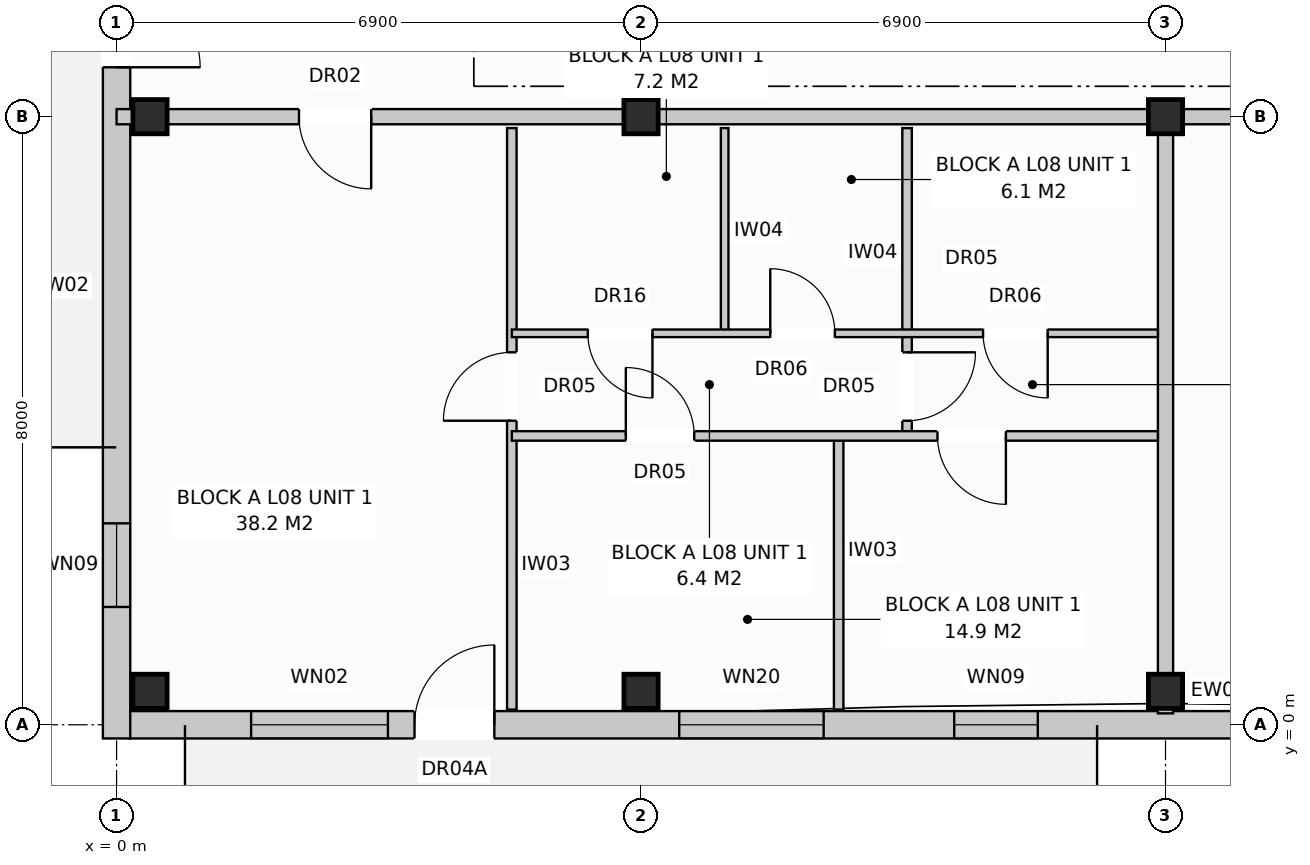
"""IFC4 building model, lengths in metres.
Left out: names, types, materials, properties, quantities, classifications, styles, units other than length and angle.
Written with IfcOpenShell. Run it as: python <this file> out.ifc"""

import sys

from ifc_helpers import new_model, si_unit, direction, frame, frame_2d, origin, origin_with_axes, origin_2d, place, context, subcontext, project, spatial, rectangle, extrude, element, fill, save


model = new_model("IFC4")
c1 = context("Model", 3, precision=1e-05, world=origin(), true_north=direction((0.0, 1.0)))
c2 = subcontext(c1, "Body", "Model", "MODEL_VIEW")
j1 = project(units=[si_unit("LENGTHUNIT", "METRE"), si_unit("PLANEANGLEUNIT", "RADIAN")], contexts=[c1])
p1 = place(None, origin())
s1 = spatial("IfcSite", under=j1, at=p1, CompositionType="ELEMENT")
p2 = place(p1, origin())
s2 = spatial("IfcBuilding", under=s1, at=p2, CompositionType="ELEMENT")
p3 = place(p2, frame((0.0, 0.0, 27.2)))
s3 = spatial("IfcBuildingStorey", under=s2, at=p3, CompositionType="ELEMENT", Elevation=27.2)
for number, where, z_axis, x_axis in (
    (1, (0.44, 0.44, 0.0), (0.0, 0.0, 1.0), (1.0, 0.0, 0.0)),
    (2, (0.44, 8.0, 0.0), (0.0, 0.0, 1.0), (1.0, 0.0, 0.0)),
    (3, (6.9, 0.44, 0.0), (0.0, 0.0, 1.0), (1.0, 0.0, 0.0)),
    (4, (6.9, 8.0, 0.0), (0.0, 0.0, 1.0), (1.0, 0.0, 0.0)),
    (5, (13.8, 0.44, 0.0), (0.0, 0.0, 1.0), (1.0, 0.0, 0.0)),
    (6, (13.8, 8.0, 0.0), (0.0, 0.0, 1.0), (1.0, 0.0, 0.0)),
):
    element("IfcColumn", number, at=place(p3, frame(where, z_axis=z_axis, x_axis=x_axis)), inside=s3, PredefinedType="COLUMN", context=c2, shape_type="SweptSolid", body=[
        extrude(rectangle(XDim=0.45, YDim=0.45, at=origin_2d()), origin(), (0.0, 0.0, 1.0), 3.2),
    ])
p4 = place(p3, frame((0.17, 0.0, 0.0), z_axis=(0.0, 0.0, 1.0), x_axis=(1.0, 0.0, 0.0)))
e7 = element("IfcWall", 7, at=p4, inside=s3, PredefinedType="STANDARD", context=c2, shape_type="SweptSolid", body=[
    extrude(rectangle(XDim=54.86, YDim=0.36, at=frame_2d((27.43, 0.0))), origin(), (0.0, 0.0, 1.0), 2.96),
])
p5 = place(p4, frame((3.75, 0.0, 0.0)))
e8 = element("IfcOpeningElement", 8, at=p5, cuts=e7, PredefinedType="OPENING", context=c2, shape_type="SweptSolid", body=[
    extrude(rectangle(XDim=1.05, YDim=2.12, at=frame_2d((0.525, 1.06))), frame((0.0, 0.192, 0.0), z_axis=(0.0, -1.0, 0.0), x_axis=(1.0, 0.0, 0.0)), (0.0, 0.0, 1.0), 0.384),
])
p6 = place(p4, frame((18.65, 0.0, 0.0)))
e9 = element("IfcOpeningElement", 9, at=p6, cuts=e7, PredefinedType="OPENING", context=c2, shape_type="SweptSolid", body=[
    extrude(rectangle(XDim=1.05, YDim=2.12, at=frame_2d((0.525, 1.06))), frame((0.0, 0.192, 0.0), z_axis=(0.0, -1.0, 0.0), x_axis=(1.0, 0.0, 0.0)), (0.0, 0.0, 1.0), 0.384),
])
p7 = place(p4, frame((29.05, 0.0, 0.0)))
e10 = element("IfcOpeningElement", 10, at=p7, cuts=e7, PredefinedType="OPENING", context=c2, shape_type="SweptSolid", body=[
    extrude(rectangle(XDim=1.05, YDim=2.12, at=frame_2d((0.525, 1.06))), frame((0.0, 0.192, 0.0), z_axis=(0.0, -1.0, 0.0), x_axis=(1.0, 0.0, 0.0)), (0.0, 0.0, 1.0), 0.384),
])
p8 = place(p4, frame((46.447, 0.0, 0.0)))
e11 = element("IfcOpeningElement", 11, at=p8, cuts=e7, PredefinedType="OPENING", context=c2, shape_type="SweptSolid", body=[
    extrude(rectangle(XDim=1.05, YDim=2.12, at=frame_2d((0.525, 1.06))), frame((0.0, 0.192, 0.0), z_axis=(0.0, -1.0, 0.0), x_axis=(1.0, 0.0, 0.0)), (0.0, 0.0, 1.0), 0.384),
])
p9 = place(p4, frame((1.6, 0.0, 0.8)))
e12 = element("IfcOpeningElement", 12, at=p9, cuts=e7, PredefinedType="OPENING", context=c2, shape_type="SweptSolid", body=[
    extrude(rectangle(XDim=1.8, YDim=1.7, at=frame_2d((0.9, 0.85))), frame((0.0, 0.192, 0.0), z_axis=(0.0, -1.0, 0.0), x_axis=(1.0, 0.0, 0.0)), (0.0, 0.0, 1.0), 0.384),
])
p10 = place(p4, frame((7.232, 0.0, 0.72)))
e13 = element("IfcOpeningElement", 13, at=p10, cuts=e7, PredefinedType="OPENING", context=c2, shape_type="SweptSolid", body=[
    extrude(rectangle(XDim=1.9, YDim=1.85, at=frame_2d((0.95, 0.925))), frame((0.0, 0.192, 0.0), z_axis=(0.0, -1.0, 0.0), x_axis=(1.0, 0.0, 0.0)), (0.0, 0.0, 1.0), 0.384),
])
p11 = place(p4, frame((10.85, 0.0, 0.72)))
e14 = element("IfcOpeningElement", 14, at=p11, cuts=e7, PredefinedType="OPENING", context=c2, shape_type="SweptSolid", body=[
    extrude(rectangle(XDim=1.1, YDim=1.5, at=frame_2d((0.55, 0.75))), frame((0.0, 0.192, 0.0), z_axis=(0.0, -1.0, 0.0), x_axis=(1.0, 0.0, 0.0)), (0.0, 0.0, 1.0), 0.384),
])
p12 = place(p4, frame((15.9, 0.0, 0.8)))
e15 = element("IfcOpeningElement", 15, at=p12, cuts=e7, PredefinedType="OPENING", context=c2, shape_type="SweptSolid", body=[
    extrude(rectangle(XDim=1.8, YDim=1.7, at=frame_2d((0.9, 0.85))), frame((0.0, 0.192, 0.0), z_axis=(0.0, -1.0, 0.0), x_axis=(1.0, 0.0, 0.0)), (0.0, 0.0, 1.0), 0.384),
])
p13 = place(p4, frame((21.55, 0.0, 0.72)))
e16 = element("IfcOpeningElement", 16, at=p13, cuts=e7, PredefinedType="OPENING", context=c2, shape_type="SweptSolid", body=[
    extrude(rectangle(XDim=1.9, YDim=1.85, at=frame_2d((0.95, 0.925))), frame((0.0, 0.192, 0.0), z_axis=(0.0, -1.0, 0.0), x_axis=(1.0, 0.0, 0.0)), (0.0, 0.0, 1.0), 0.384),
])
p14 = place(p4, frame((25.6, 0.0, 0.72)))
e17 = element("IfcOpeningElement", 17, at=p14, cuts=e7, PredefinedType="OPENING", context=c2, shape_type="SweptSolid", body=[
    extrude(rectangle(XDim=1.1, YDim=1.5, at=frame_2d((0.55, 0.75))), frame((0.0, 0.192, 0.0), z_axis=(0.0, -1.0, 0.0), x_axis=(1.0, 0.0, 0.0)), (0.0, 0.0, 1.0), 0.384),
])
p15 = place(p4, frame((31.4, 0.0, 0.8)))
e18 = element("IfcOpeningElement", 18, at=p15, cuts=e7, PredefinedType="OPENING", context=c2, shape_type="SweptSolid", body=[
    extrude(rectangle(XDim=1.8, YDim=1.7, at=frame_2d((0.9, 0.85))), frame((0.0, 0.192, 0.0), z_axis=(0.0, -1.0, 0.0), x_axis=(1.0, 0.0, 0.0)), (0.0, 0.0, 1.0), 0.384),
])
p16 = place(p4, frame((35.55, 0.0, 0.72)))
e19 = element("IfcOpeningElement", 19, at=p16, cuts=e7, PredefinedType="OPENING", context=c2, shape_type="SweptSolid", body=[
    extrude(rectangle(XDim=1.9, YDim=1.85, at=frame_2d((0.95, 0.925))), frame((0.0, 0.192, 0.0), z_axis=(0.0, -1.0, 0.0), x_axis=(1.0, 0.0, 0.0)), (0.0, 0.0, 1.0), 0.384),
])
p17 = place(p4, frame((39.25, 0.0, 0.72)))
e20 = element("IfcOpeningElement", 20, at=p17, cuts=e7, PredefinedType="OPENING", context=c2, shape_type="SweptSolid", body=[
    extrude(rectangle(XDim=1.1, YDim=1.5, at=frame_2d((0.55, 0.75))), frame((0.0, 0.192, 0.0), z_axis=(0.0, -1.0, 0.0), x_axis=(1.0, 0.0, 0.0)), (0.0, 0.0, 1.0), 0.384),
])
p18 = place(p4, frame((44.3, 0.0, 0.8)))
e21 = element("IfcOpeningElement", 21, at=p18, cuts=e7, PredefinedType="OPENING", context=c2, shape_type="SweptSolid", body=[
    extrude(rectangle(XDim=1.8, YDim=1.7, at=frame_2d((0.9, 0.85))), frame((0.0, 0.192, 0.0), z_axis=(0.0, -1.0, 0.0), x_axis=(1.0, 0.0, 0.0)), (0.0, 0.0, 1.0), 0.384),
])
p19 = place(p4, frame((49.55, 0.0, 0.72)))
e22 = element("IfcOpeningElement", 22, at=p19, cuts=e7, PredefinedType="OPENING", context=c2, shape_type="SweptSolid", body=[
    extrude(rectangle(XDim=1.1, YDim=1.5, at=frame_2d((0.55, 0.75))), frame((0.0, 0.192, 0.0), z_axis=(0.0, -1.0, 0.0), x_axis=(1.0, 0.0, 0.0)), (0.0, 0.0, 1.0), 0.384),
])
p20 = place(p4, frame((52.29, 0.0, 0.8)))
e23 = element("IfcOpeningElement", 23, at=p20, cuts=e7, PredefinedType="OPENING", context=c2, shape_type="SweptSolid", body=[
    extrude(rectangle(XDim=1.95, YDim=1.65, at=frame_2d((0.975, 0.825))), frame((0.0, 0.192, 0.0), z_axis=(0.0, -1.0, 0.0), x_axis=(1.0, 0.0, 0.0)), (0.0, 0.0, 1.0), 0.384),
])
p21 = place(p3, frame((0.0, -0.18, 0.0), z_axis=(0.0, 0.0, 1.0), x_axis=(0.0, 1.0, 0.0)))
e24 = element("IfcWall", 24, at=p21, inside=s3, PredefinedType="STANDARD", context=c2, shape_type="SweptSolid", body=[
    extrude(rectangle(XDim=18.76, YDim=0.36, at=frame_2d((9.38, 0.0))), origin(), (0.0, 0.0, 1.0), 2.96),
])
p22 = place(p21, frame((8.83, 0.0, 0.0)))
e25 = element("IfcOpeningElement", 25, at=p22, cuts=e24, PredefinedType="OPENING", context=c2, shape_type="SweptSolid", body=[
    extrude(rectangle(XDim=1.1, YDim=2.1, at=frame_2d((0.55, 1.05))), frame((0.0, 0.192, 0.0), z_axis=(0.0, -1.0, 0.0), x_axis=(1.0, 0.0, 0.0)), (0.0, 0.0, 1.0), 0.384),
])
p23 = place(p21, frame((1.73, 0.0, 0.72)))
e26 = element("IfcOpeningElement", 26, at=p23, cuts=e24, PredefinedType="OPENING", context=c2, shape_type="SweptSolid", body=[
    extrude(rectangle(XDim=1.1, YDim=1.5, at=frame_2d((0.55, 0.75))), frame((0.0, 0.192, 0.0), z_axis=(0.0, -1.0, 0.0), x_axis=(1.0, 0.0, 0.0)), (0.0, 0.0, 1.0), 0.384),
])
p24 = place(p21, frame((15.93, 0.0, 0.72)))
e27 = element("IfcOpeningElement", 27, at=p24, cuts=e24, PredefinedType="OPENING", context=c2, shape_type="SweptSolid", body=[
    extrude(rectangle(XDim=1.1, YDim=1.5, at=frame_2d((0.55, 0.75))), frame((0.0, 0.192, 0.0), z_axis=(0.0, -1.0, 0.0), x_axis=(1.0, 0.0, 0.0)), (0.0, 0.0, 1.0), 0.384),
])
p25 = place(p3, frame((13.8, 7.85, 0.0), z_axis=(0.0, 0.0, 1.0), x_axis=(0.0, -1.0, 0.0)))
e28 = element("IfcWall", 28, at=p25, inside=s3, PredefinedType="PARTITIONING", context=c2, shape_type="SweptSolid", body=[
    extrude(rectangle(XDim=7.7, YDim=0.2, at=frame_2d((3.85, 0.0))), origin(), (0.0, 0.0, 1.0), 2.96),
])
p26 = place(p3, frame((0.0, 8.0, 0.0), z_axis=(0.0, 0.0, 1.0), x_axis=(1.0, 0.0, 0.0)))
e29 = element("IfcWall", 29, at=p26, inside=s3, PredefinedType="PARTITIONING", context=c2, shape_type="SweptSolid", body=[
    extrude(rectangle(XDim=13.8, YDim=0.2, at=frame_2d((6.9, 0.0))), origin(), (0.0, 0.0, 1.0), 2.4),
])
p27 = place(p26, frame((2.4, 0.0, 0.0)))
e30 = element("IfcOpeningElement", 30, at=p27, cuts=e29, PredefinedType="OPENING", context=c2, shape_type="SweptSolid", body=[
    extrude(rectangle(XDim=0.95, YDim=2.15, at=frame_2d((0.475, 1.075))), frame((0.0, 0.112, 0.0), z_axis=(0.0, -1.0, 0.0), x_axis=(1.0, 0.0, 0.0)), (0.0, 0.0, 1.0), 0.224),
])
p28 = place(p3, frame((5.2, 7.85, 0.0), z_axis=(0.0, 0.0, 1.0), x_axis=(0.0, -1.0, 0.0)))
e31 = element("IfcWall", 31, at=p28, inside=s3, PredefinedType="PARTITIONING", context=c2, shape_type="SweptSolid", body=[
    extrude(rectangle(XDim=7.65, YDim=0.125, at=frame_2d((3.825, 0.0))), origin(), (0.0, 0.0, 1.0), 2.96),
])
p29 = place(p28, frame((2.95, 0.0, 0.0)))
e32 = element("IfcOpeningElement", 32, at=p29, cuts=e31, PredefinedType="OPENING", context=c2, shape_type="SweptSolid", body=[
    extrude(rectangle(XDim=0.9, YDim=2.1, at=frame_2d((0.45, 1.05))), frame((0.0, 0.074, 0.0), z_axis=(0.0, -1.0, 0.0), x_axis=(1.0, 0.0, 0.0)), (0.0, 0.0, 1.0), 0.149),
])
p30 = place(p3, frame((8.0, 7.85, 0.0), z_axis=(0.0, 0.0, 1.0), x_axis=(0.0, -1.0, 0.0)))
e33 = element("IfcWall", 33, at=p30, inside=s3, PredefinedType="PARTITIONING", context=c2, shape_type="SweptSolid", body=[
    extrude(rectangle(XDim=2.7, YDim=0.1, at=frame_2d((1.35, 0.0))), origin(), (0.0, 0.0, 1.0), 2.96),
])
p31 = place(p3, frame((10.4, 7.85, 0.0), z_axis=(0.0, 0.0, 1.0), x_axis=(0.0, -1.0, 0.0)))
e34 = element("IfcWall", 34, at=p31, inside=s3, PredefinedType="PARTITIONING", context=c2, shape_type="SweptSolid", body=[
    extrude(rectangle(XDim=4.05, YDim=0.125, at=frame_2d((2.025, 0.0))), origin(), (0.0, 0.0, 1.0), 2.96),
])
p32 = place(p31, frame((2.95, 0.0, 0.0)))
e35 = element("IfcOpeningElement", 35, at=p32, cuts=e34, PredefinedType="OPENING", context=c2, shape_type="SweptSolid", body=[
    extrude(rectangle(XDim=0.9, YDim=2.1, at=frame_2d((0.45, 1.05))), frame((0.0, 0.074, 0.0), z_axis=(0.0, -1.0, 0.0), x_axis=(1.0, 0.0, 0.0)), (0.0, 0.0, 1.0), 0.149),
])
p33 = place(p3, frame((9.5, 3.8, 0.0), z_axis=(0.0, 0.0, 1.0), x_axis=(0.0, -1.0, 0.0)))
e36 = element("IfcWall", 36, at=p33, inside=s3, PredefinedType="PARTITIONING", context=c2, shape_type="SweptSolid", body=[
    extrude(rectangle(XDim=3.6, YDim=0.125, at=frame_2d((1.8, 0.0))), origin(), (0.0, 0.0, 1.0), 2.96),
])
p34 = place(p3, frame((5.2, 5.15, 0.0), z_axis=(0.0, 0.0, 1.0), x_axis=(1.0, 0.0, 0.0)))
e37 = element("IfcWall", 37, at=p34, inside=s3, PredefinedType="PARTITIONING", context=c2, shape_type="SweptSolid", body=[
    extrude(rectangle(XDim=8.5, YDim=0.1, at=frame_2d((4.25, 0.0))), origin(), (0.0, 0.0, 1.0), 2.96),
])
p35 = place(p34, frame((1.0, 0.0, 0.0)))
e38 = element("IfcOpeningElement", 38, at=p35, cuts=e37, PredefinedType="OPENING", context=c2, shape_type="SweptSolid", body=[
    extrude(rectangle(XDim=0.85, YDim=2.1, at=frame_2d((0.425, 1.05))), frame((0.0, 0.062, 0.0), z_axis=(0.0, -1.0, 0.0), x_axis=(1.0, 0.0, 0.0)), (0.0, 0.0, 1.0), 0.124),
])
p36 = place(p34, frame((3.4, 0.0, 0.0)))
e39 = element("IfcOpeningElement", 39, at=p36, cuts=e37, PredefinedType="OPENING", context=c2, shape_type="SweptSolid", body=[
    extrude(rectangle(XDim=0.85, YDim=2.05, at=frame_2d((0.425, 1.025))), frame((0.0, 0.062, 0.0), z_axis=(0.0, -1.0, 0.0), x_axis=(1.0, 0.0, 0.0)), (0.0, 0.0, 1.0), 0.124),
])
p37 = place(p34, frame((6.2, 0.0, 0.0)))
e40 = element("IfcOpeningElement", 40, at=p37, cuts=e37, PredefinedType="OPENING", context=c2, shape_type="SweptSolid", body=[
    extrude(rectangle(XDim=0.85, YDim=2.05, at=frame_2d((0.425, 1.025))), frame((0.0, 0.062, 0.0), z_axis=(0.0, -1.0, 0.0), x_axis=(1.0, 0.0, 0.0)), (0.0, 0.0, 1.0), 0.124),
])
p38 = place(p3, frame((5.2, 3.8, 0.0), z_axis=(0.0, 0.0, 1.0), x_axis=(1.0, 0.0, 0.0)))
e41 = element("IfcWall", 41, at=p38, inside=s3, PredefinedType="PARTITIONING", context=c2, shape_type="SweptSolid", body=[
    extrude(rectangle(XDim=8.5, YDim=0.125, at=frame_2d((4.25, 0.0))), origin(), (0.0, 0.0, 1.0), 2.96),
])
p39 = place(p38, frame((1.5, 0.0, 0.0)))
e42 = element("IfcOpeningElement", 42, at=p39, cuts=e41, PredefinedType="OPENING", context=c2, shape_type="SweptSolid", body=[
    extrude(rectangle(XDim=0.9, YDim=2.1, at=frame_2d((0.45, 1.05))), frame((0.0, 0.074, 0.0), z_axis=(0.0, -1.0, 0.0), x_axis=(1.0, 0.0, 0.0)), (0.0, 0.0, 1.0), 0.149),
])
p40 = place(p38, frame((5.6, 0.0, 0.0)))
e43 = element("IfcOpeningElement", 43, at=p40, cuts=e41, PredefinedType="OPENING", context=c2, shape_type="SweptSolid", body=[
    extrude(rectangle(XDim=0.9, YDim=2.1, at=frame_2d((0.45, 1.05))), frame((0.0, 0.074, 0.0), z_axis=(0.0, -1.0, 0.0), x_axis=(1.0, 0.0, 0.0)), (0.0, 0.0, 1.0), 0.149),
])
p41 = place(p3, frame((13.8, 8.0, 0.0), z_axis=(0.0, 0.0, 1.0), x_axis=(1.0, 0.0, 0.0)))
e44 = element("IfcWall", 44, at=p41, inside=s3, PredefinedType="PARTITIONING", context=c2, shape_type="SweptSolid", body=[
    extrude(rectangle(XDim=20.7, YDim=0.2, at=frame_2d((10.35, 0.0))), origin(), (0.0, 0.0, 1.0), 2.4),
])
p42 = place(p41, frame((2.4, 0.0, 0.0)))
e45 = element("IfcOpeningElement", 45, at=p42, cuts=e44, PredefinedType="OPENING", context=c2, shape_type="SweptSolid", body=[
    extrude(rectangle(XDim=0.95, YDim=2.15, at=frame_2d((0.475, 1.075))), frame((0.0, 0.112, 0.0), z_axis=(0.0, -1.0, 0.0), x_axis=(1.0, 0.0, 0.0)), (0.0, 0.0, 1.0), 0.224),
])
p43 = place(p5, origin_with_axes())
e46 = element("IfcDoor", 46, at=p43, inside=s3, OperationType="SINGLE_SWING_RIGHT", PredefinedType="DOOR", context=c2, shape_type="SweptSolid", body=[
    extrude(rectangle(XDim=1.05, YDim=2.12, at=frame_2d((0.525, 1.06))), frame((0.0, 0.025, 0.0), z_axis=(0.0, -1.0, 0.0), x_axis=(1.0, 0.0, 0.0)), (0.0, 0.0, 1.0), 0.05),
])
fill(e8, e46)
p44 = place(p9, origin_with_axes())
e47 = element("IfcWindow", 47, at=p44, inside=s3, PartitioningType="SINGLE_PANEL", PredefinedType="WINDOW", context=c2, shape_type="SweptSolid", body=[
    extrude(rectangle(XDim=1.8, YDim=1.7, at=frame_2d((0.9, 0.85))), frame((0.0, 0.03, 0.0), z_axis=(0.0, -1.0, 0.0), x_axis=(1.0, 0.0, 0.0)), (0.0, 0.0, 1.0), 0.06),
])
fill(e12, e47)
p45 = place(p10, origin_with_axes())
e48 = element("IfcWindow", 48, at=p45, inside=s3, PartitioningType="SINGLE_PANEL", PredefinedType="WINDOW", context=c2, shape_type="SweptSolid", body=[
    extrude(rectangle(XDim=1.9, YDim=1.85, at=frame_2d((0.95, 0.925))), frame((0.0, 0.03, 0.0), z_axis=(0.0, -1.0, 0.0), x_axis=(1.0, 0.0, 0.0)), (0.0, 0.0, 1.0), 0.06),
])
fill(e13, e48)
p46 = place(p11, origin_with_axes())
e49 = element("IfcWindow", 49, at=p46, inside=s3, PartitioningType="SINGLE_PANEL", PredefinedType="WINDOW", context=c2, shape_type="SweptSolid", body=[
    extrude(rectangle(XDim=1.1, YDim=1.5, at=frame_2d((0.55, 0.75))), frame((0.0, 0.03, 0.0), z_axis=(0.0, -1.0, 0.0), x_axis=(1.0, 0.0, 0.0)), (0.0, 0.0, 1.0), 0.06),
])
fill(e14, e49)
p47 = place(p22, frame((1.1, 0.0, 0.0), z_axis=(0.0, 0.0, 1.0), x_axis=(-1.0, 0.0, 0.0)))
e50 = element("IfcDoor", 50, at=p47, inside=s3, OperationType="SINGLE_SWING_LEFT", PredefinedType="DOOR", context=c2, shape_type="SweptSolid", body=[
    extrude(rectangle(XDim=1.1, YDim=2.1, at=frame_2d((0.55, 1.05))), frame((0.0, 0.025, 0.0), z_axis=(0.0, -1.0, 0.0), x_axis=(1.0, 0.0, 0.0)), (0.0, 0.0, 1.0), 0.05),
])
fill(e25, e50)
p48 = place(p23, origin_with_axes())
e51 = element("IfcWindow", 51, at=p48, inside=s3, PartitioningType="SINGLE_PANEL", PredefinedType="WINDOW", context=c2, shape_type="SweptSolid", body=[
    extrude(rectangle(XDim=1.1, YDim=1.5, at=frame_2d((0.55, 0.75))), frame((0.0, 0.03, 0.0), z_axis=(0.0, -1.0, 0.0), x_axis=(1.0, 0.0, 0.0)), (0.0, 0.0, 1.0), 0.06),
])
fill(e26, e51)
p49 = place(p27, frame((0.95, 0.0, 0.0), z_axis=(0.0, 0.0, 1.0), x_axis=(-1.0, 0.0, 0.0)))
e52 = element("IfcDoor", 52, at=p49, inside=s3, OperationType="SINGLE_SWING_RIGHT", PredefinedType="DOOR", context=c2, shape_type="SweptSolid", body=[
    extrude(rectangle(XDim=0.95, YDim=2.15, at=frame_2d((0.475, 1.075))), frame((0.0, 0.025, 0.0), z_axis=(0.0, -1.0, 0.0), x_axis=(1.0, 0.0, 0.0)), (0.0, 0.0, 1.0), 0.05),
])
fill(e30, e52)
p50 = place(p29, frame((0.9, 0.0, 0.0), z_axis=(0.0, 0.0, 1.0), x_axis=(-1.0, 0.0, 0.0)))
e53 = element("IfcDoor", 53, at=p50, inside=s3, OperationType="SINGLE_SWING_RIGHT", PredefinedType="DOOR", context=c2, shape_type="SweptSolid", body=[
    extrude(rectangle(XDim=0.9, YDim=2.1, at=frame_2d((0.45, 1.05))), frame((0.0, 0.025, 0.0), z_axis=(0.0, -1.0, 0.0), x_axis=(1.0, 0.0, 0.0)), (0.0, 0.0, 1.0), 0.05),
])
fill(e32, e53)
p51 = place(p32, origin_with_axes())
e54 = element("IfcDoor", 54, at=p51, inside=s3, OperationType="SINGLE_SWING_LEFT", PredefinedType="DOOR", context=c2, shape_type="SweptSolid", body=[
    extrude(rectangle(XDim=0.9, YDim=2.1, at=frame_2d((0.45, 1.05))), frame((0.0, 0.025, 0.0), z_axis=(0.0, -1.0, 0.0), x_axis=(1.0, 0.0, 0.0)), (0.0, 0.0, 1.0), 0.05),
])
fill(e35, e54)
p52 = place(p35, frame((0.85, 0.0, 0.0), z_axis=(0.0, 0.0, 1.0), x_axis=(-1.0, 0.0, 0.0)))
e55 = element("IfcDoor", 55, at=p52, inside=s3, OperationType="SINGLE_SWING_RIGHT", PredefinedType="DOOR", context=c2, shape_type="SweptSolid", body=[
    extrude(rectangle(XDim=0.85, YDim=2.1, at=frame_2d((0.425, 1.05))), frame((0.0, 0.025, 0.0), z_axis=(0.0, -1.0, 0.0), x_axis=(1.0, 0.0, 0.0)), (0.0, 0.0, 1.0), 0.05),
])
fill(e38, e55)
p53 = place(p36, origin_with_axes())
e56 = element("IfcDoor", 56, at=p53, inside=s3, OperationType="SINGLE_SWING_LEFT", PredefinedType="DOOR", context=c2, shape_type="SweptSolid", body=[
    extrude(rectangle(XDim=0.85, YDim=2.05, at=frame_2d((0.425, 1.025))), frame((0.0, 0.025, 0.0), z_axis=(0.0, -1.0, 0.0), x_axis=(1.0, 0.0, 0.0)), (0.0, 0.0, 1.0), 0.05),
])
fill(e39, e56)
p54 = place(p37, frame((0.85, 0.0, 0.0), z_axis=(0.0, 0.0, 1.0), x_axis=(-1.0, 0.0, 0.0)))
e57 = element("IfcDoor", 57, at=p54, inside=s3, OperationType="SINGLE_SWING_RIGHT", PredefinedType="DOOR", context=c2, shape_type="SweptSolid", body=[
    extrude(rectangle(XDim=0.85, YDim=2.05, at=frame_2d((0.425, 1.025))), frame((0.0, 0.025, 0.0), z_axis=(0.0, -1.0, 0.0), x_axis=(1.0, 0.0, 0.0)), (0.0, 0.0, 1.0), 0.05),
])
fill(e40, e57)
p55 = place(p39, origin_with_axes())
e58 = element("IfcDoor", 58, at=p55, inside=s3, OperationType="SINGLE_SWING_LEFT", PredefinedType="DOOR", context=c2, shape_type="SweptSolid", body=[
    extrude(rectangle(XDim=0.9, YDim=2.1, at=frame_2d((0.45, 1.05))), frame((0.0, 0.025, 0.0), z_axis=(0.0, -1.0, 0.0), x_axis=(1.0, 0.0, 0.0)), (0.0, 0.0, 1.0), 0.05),
])
fill(e42, e58)
p56 = place(p40, frame((0.9, 0.0, 0.0), z_axis=(0.0, 0.0, 1.0), x_axis=(-1.0, 0.0, 0.0)))
e59 = element("IfcDoor", 59, at=p56, inside=s3, OperationType="SINGLE_SWING_RIGHT", PredefinedType="DOOR", context=c2, shape_type="SweptSolid", body=[
    extrude(rectangle(XDim=0.9, YDim=2.1, at=frame_2d((0.45, 1.05))), frame((0.0, 0.025, 0.0), z_axis=(0.0, -1.0, 0.0), x_axis=(1.0, 0.0, 0.0)), (0.0, 0.0, 1.0), 0.05),
])
fill(e43, e59)
save(model, sys.argv[1])
